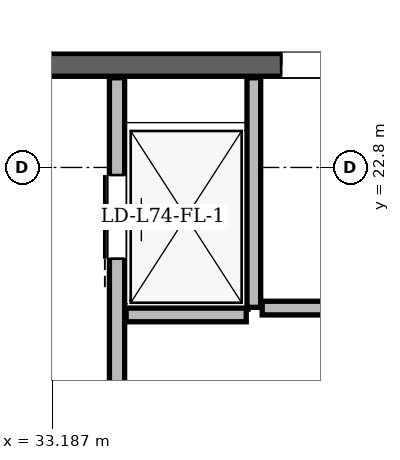
"""IFC4 building model, lengths in metres.
Left out: names, types, materials, properties, quantities, classifications, styles, units other than length and angle.
Written with IfcOpenShell. Run it as: python <this file> out.ifc"""

import sys

from ifc_helpers import new_model, si_unit, direction, frame, frame_2d, origin, place, context, subcontext, project, spatial, rectangle, extrude, element, fill, save


model = new_model("IFC4")
c1 = context("Model", 3, precision=1e-05, world=origin(), true_north=direction((0.0, 1.0)))
c2 = subcontext(c1, "Body", "Model", "MODEL_VIEW")
j1 = project(units=[si_unit("LENGTHUNIT", "METRE"), si_unit("PLANEANGLEUNIT", "RADIAN")], contexts=[c1])
p1 = place(None, origin())
s1 = spatial("IfcSite", under=j1, at=p1, CompositionType="ELEMENT")
p2 = place(p1, origin())
s2 = spatial("IfcBuilding", under=s1, at=p2, CompositionType="ELEMENT")
p3 = place(p2, frame((0.0, 0.0, 281.1)))
s3 = spatial("IfcBuildingStorey", under=s2, at=p3, CompositionType="ELEMENT", Elevation=281.1)
p4 = place(p3, frame((29.65, 24.15, 0.0), z_axis=(0.0, 0.0, 1.0), x_axis=(1.0, 0.0, 0.0)))
e1 = element("IfcWall", 1, at=p4, inside=s3, PredefinedType="SHEAR", context=c2, shape_type="SweptSolid", body=[
    extrude(rectangle(XDim=15.7, YDim=0.3, at=frame_2d((7.85, 0.0))), origin(), (0.0, 0.0, 1.0), 3.68),
])
p5 = place(p4, frame((1.7, 0.0, 0.0)))
e2 = element("IfcOpeningElement", 2, at=p5, cuts=e1, PredefinedType="OPENING", context=c2, shape_type="SweptSolid", body=[
    extrude(rectangle(XDim=1.2, YDim=2.2, at=frame_2d((0.6, 1.1))), frame((0.0, 0.15, 0.0), z_axis=(0.0, -1.0, 0.0), x_axis=(1.0, 0.0, 0.0)), (0.0, 0.0, 1.0), 0.3),
])
p6 = place(p4, frame((12.8, 0.0, 0.0)))
e3 = element("IfcOpeningElement", 3, at=p6, cuts=e1, PredefinedType="OPENING", context=c2, shape_type="SweptSolid", body=[
    extrude(rectangle(XDim=1.2, YDim=2.2, at=frame_2d((0.6, 1.1))), frame((0.0, 0.15, 0.0), z_axis=(0.0, -1.0, 0.0), x_axis=(1.0, 0.0, 0.0)), (0.0, 0.0, 1.0), 0.3),
])
p7 = place(p4, frame((6.55, 0.0, 0.0)))
e4 = element("IfcOpeningElement", 4, at=p7, cuts=e1, PredefinedType="OPENING", context=c2, shape_type="SweptSolid", body=[
    extrude(rectangle(XDim=0.9, YDim=2.05, at=frame_2d((0.45, 1.025))), frame((0.0, 0.15, 0.0), z_axis=(0.0, -1.0, 0.0), x_axis=(1.0, 0.0, 0.0)), (0.0, 0.0, 1.0), 0.3),
])
p8 = place(p4, frame((8.45, 0.0, 0.0)))
e5 = element("IfcOpeningElement", 5, at=p8, cuts=e1, PredefinedType="OPENING", context=c2, shape_type="SweptSolid", body=[
    extrude(rectangle(XDim=0.9, YDim=2.05, at=frame_2d((0.45, 1.025))), frame((0.0, 0.15, 0.0), z_axis=(0.0, -1.0, 0.0), x_axis=(1.0, 0.0, 0.0)), (0.0, 0.0, 1.0), 0.3),
])
p9 = place(p3, frame((35.264, 43.004, 0.0), z_axis=(0.0, 0.0, 1.0), x_axis=(-0.500002460556, -0.866023983177, 0.0)))
e6 = element("IfcWall", 6, at=p9, inside=s3, PredefinedType="SOLIDWALL", context=c2, shape_type="SweptSolid", body=[
    extrude(rectangle(XDim=37.435, YDim=0.29, at=frame_2d((18.718, 0.0))), origin(), (0.0, 0.0, 1.0), 3.058),
])
p10 = place(p9, frame((3.639, 0.0, 0.0)))
e7 = element("IfcOpeningElement", 7, at=p10, cuts=e6, PredefinedType="OPENING", context=c2, shape_type="SweptSolid", body=[
    extrude(rectangle(XDim=1.5, YDim=2.2, at=frame_2d((0.75, 1.1))), frame((0.0, 0.145, 0.0), z_axis=(0.0, -1.0, 0.0), x_axis=(1.0, 0.0, 0.0)), (0.0, 0.0, 1.0), 0.29),
])
p11 = place(p9, frame((27.481, 0.0, 0.0)))
e8 = element("IfcOpeningElement", 8, at=p11, cuts=e6, PredefinedType="OPENING", context=c2, shape_type="SweptSolid", body=[
    extrude(rectangle(XDim=1.5, YDim=2.2, at=frame_2d((0.75, 1.1))), frame((0.0, 0.145, 0.0), z_axis=(0.0, -1.0, 0.0), x_axis=(1.0, 0.0, 0.0)), (0.0, 0.0, 1.0), 0.29),
])
p12 = place(p9, frame((35.251, 0.0, 0.85)))
e9 = element("IfcOpeningElement", 9, at=p12, cuts=e6, PredefinedType="OPENING", context=c2, shape_type="SweptSolid", body=[
    extrude(rectangle(XDim=1.2, YDim=1.48, at=frame_2d((0.6, 0.74))), frame((0.0, 0.145, 0.0), z_axis=(0.0, -1.0, 0.0), x_axis=(1.0, 0.0, 0.0)), (0.0, 0.0, 1.0), 0.29),
])
p13 = place(p9, frame((29.441, 0.0, 0.85)))
e10 = element("IfcOpeningElement", 10, at=p13, cuts=e6, PredefinedType="OPENING", context=c2, shape_type="SweptSolid", body=[
    extrude(rectangle(XDim=1.2, YDim=1.48, at=frame_2d((0.6, 0.74))), frame((0.0, 0.145, 0.0), z_axis=(0.0, -1.0, 0.0), x_axis=(1.0, 0.0, 0.0)), (0.0, 0.0, 1.0), 0.29),
])
p14 = place(p9, frame((32.709, 0.0, 0.85)))
e11 = element("IfcOpeningElement", 11, at=p14, cuts=e6, PredefinedType="OPENING", context=c2, shape_type="SweptSolid", body=[
    extrude(rectangle(XDim=1.2, YDim=1.48, at=frame_2d((0.6, 0.74))), frame((0.0, 0.145, 0.0), z_axis=(0.0, -1.0, 0.0), x_axis=(1.0, 0.0, 0.0)), (0.0, 0.0, 1.0), 0.29),
])
p15 = place(p9, frame((20.345, 0.0, 0.85)))
e12 = element("IfcOpeningElement", 12, at=p15, cuts=e6, PredefinedType="OPENING", context=c2, shape_type="SweptSolid", body=[
    extrude(rectangle(XDim=1.2, YDim=1.48, at=frame_2d((0.6, 0.74))), frame((0.0, 0.145, 0.0), z_axis=(0.0, -1.0, 0.0), x_axis=(1.0, 0.0, 0.0)), (0.0, 0.0, 1.0), 0.29),
])
p16 = place(p9, frame((22.614, 0.0, 0.85)))
e13 = element("IfcOpeningElement", 13, at=p16, cuts=e6, PredefinedType="OPENING", context=c2, shape_type="SweptSolid", body=[
    extrude(rectangle(XDim=1.2, YDim=1.48, at=frame_2d((0.6, 0.74))), frame((0.0, 0.145, 0.0), z_axis=(0.0, -1.0, 0.0), x_axis=(1.0, 0.0, 0.0)), (0.0, 0.0, 1.0), 0.29),
])
p17 = place(p9, frame((1.862, 0.0, 0.85)))
e14 = element("IfcOpeningElement", 14, at=p17, cuts=e6, PredefinedType="OPENING", context=c2, shape_type="SweptSolid", body=[
    extrude(rectangle(XDim=1.2, YDim=1.48, at=frame_2d((0.6, 0.74))), frame((0.0, 0.145, 0.0), z_axis=(0.0, -1.0, 0.0), x_axis=(1.0, 0.0, 0.0)), (0.0, 0.0, 1.0), 0.29),
])
p18 = place(p9, frame((8.825, 0.0, 0.85)))
e15 = element("IfcOpeningElement", 15, at=p18, cuts=e6, PredefinedType="OPENING", context=c2, shape_type="SweptSolid", body=[
    extrude(rectangle(XDim=1.2, YDim=1.48, at=frame_2d((0.6, 0.74))), frame((0.0, 0.145, 0.0), z_axis=(0.0, -1.0, 0.0), x_axis=(1.0, 0.0, 0.0)), (0.0, 0.0, 1.0), 0.29),
])
p19 = place(p3, frame((34.04, 19.48, 0.0), z_axis=(0.0, 0.0, 1.0), x_axis=(0.0, 1.0, 0.0)))
e16 = element("IfcWall", 16, at=p19, inside=s3, PredefinedType="PARTITIONING", context=c2, shape_type="SweptSolid", body=[
    extrude(rectangle(XDim=4.5, YDim=0.2, at=frame_2d((2.25, 0.0))), origin(), (0.0, 0.0, 1.0), 3.68),
])
p20 = place(p19, frame((2.12, 0.0, 0.0)))
e17 = element("IfcOpeningElement", 17, at=p20, cuts=e16, PredefinedType="OPENING", context=c2, shape_type="SweptSolid", body=[
    extrude(rectangle(XDim=1.1, YDim=2.2, at=frame_2d((0.55, 1.1))), frame((0.0, 0.1, 0.0), z_axis=(0.0, -1.0, 0.0), x_axis=(1.0, 0.0, 0.0)), (0.0, 0.0, 1.0), 0.2),
])
p21 = place(p3, frame((35.84, 20.96, 0.0), z_axis=(0.0, 0.0, 1.0), x_axis=(0.0, 1.0, 0.0)))
e18 = element("IfcWall", 18, at=p21, inside=s3, PredefinedType="PARTITIONING", context=c2, shape_type="SweptSolid", body=[
    extrude(rectangle(XDim=3.02, YDim=0.18, at=frame_2d((1.51, 0.0))), origin(), (0.0, 0.0, 1.0), 3.68),
])
p22 = place(p3, frame((34.16, 20.86, 0.0), z_axis=(0.0, 0.0, 1.0), x_axis=(1.0, 0.0, 0.0)))
e19 = element("IfcWall", 19, at=p22, inside=s3, PredefinedType="PARTITIONING", context=c2, shape_type="SweptSolid", body=[
    extrude(rectangle(XDim=1.58, YDim=0.18, at=frame_2d((0.79, 0.0))), origin(), (0.0, 0.0, 1.0), 3.68),
])
p23 = place(p3, frame((35.95, 20.95, 0.0), z_axis=(0.0, 0.0, 1.0), x_axis=(1.0, 0.0, 0.0)))
e20 = element("IfcWall", 20, at=p23, inside=s3, PredefinedType="PARTITIONING", context=c2, shape_type="SweptSolid", body=[
    extrude(rectangle(XDim=3.1, YDim=0.18, at=frame_2d((1.55, 0.0))), origin(), (0.0, 0.0, 1.0), 3.68),
])
p24 = place(p20, origin())
e21 = element("IfcDoor", 21, at=p24, inside=s3, OperationType="SLIDING_TO_LEFT", PredefinedType="DOOR", context=c2, shape_type="SweptSolid", body=[
    extrude(rectangle(XDim=1.1, YDim=2.2, at=frame_2d((0.55, 1.1))), frame((0.0, 0.025, 0.0), z_axis=(0.0, -1.0, 0.0), x_axis=(1.0, 0.0, 0.0)), (0.0, 0.0, 1.0), 0.05),
])
fill(e17, e21)
p25 = place(p7, origin())
e22 = element("IfcDoor", 22, at=p25, inside=s3, OperationType="SINGLE_SWING_LEFT", PredefinedType="DOOR", context=c2, shape_type="SweptSolid", body=[
    extrude(rectangle(XDim=0.9, YDim=2.05, at=frame_2d((0.45, 1.025))), frame((0.0, 0.025, 0.0), z_axis=(0.0, -1.0, 0.0), x_axis=(1.0, 0.0, 0.0)), (0.0, 0.0, 1.0), 0.05),
])
fill(e4, e22)
save(model, sys.argv[1])
